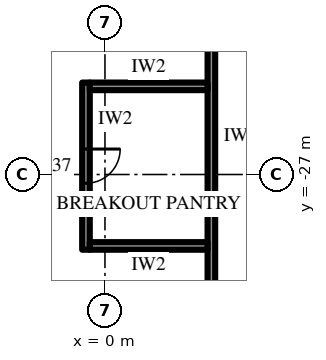
"""IFC4 building model, lengths in metres.
Left out: names, types, materials, properties, quantities, classifications, styles, units other than length and angle.
Written with IfcOpenShell. Run it as: python <this file> out.ifc"""

import sys

from ifc_helpers import new_model, si_unit, direction, frame, frame_2d, origin, place, context, subcontext, project, spatial, rectangle, extrude, element, fill, save


model = new_model("IFC4")
c1 = context("Model", 3, precision=1e-05, world=origin(), true_north=direction((0.0, 1.0)))
c2 = subcontext(c1, "Body", "Model", "MODEL_VIEW")
j1 = project(units=[si_unit("LENGTHUNIT", "METRE"), si_unit("PLANEANGLEUNIT", "RADIAN")], contexts=[c1])
p1 = place(None, origin())
s1 = spatial("IfcSite", under=j1, at=p1, CompositionType="ELEMENT")
p2 = place(p1, origin())
s2 = spatial("IfcBuilding", under=s1, at=p2, CompositionType="ELEMENT")
p3 = place(p2, frame((0.0, 0.0, 36.1)))
s3 = spatial("IfcBuildingStorey", under=s2, at=p3, CompositionType="ELEMENT", Elevation=36.1)
p4 = place(p3, frame((2.8, -18.2, 0.0), z_axis=(0.0, 0.0, 1.0), x_axis=(0.0, -1.0, 0.0)))
e1 = element("IfcWall", 1, at=p4, inside=s3, PredefinedType="PARTITIONING", context=c2, shape_type="SweptSolid", body=[
    extrude(rectangle(XDim=15.6, YDim=0.2, at=frame_2d((7.8, 0.0))), origin(), (0.0, 0.0, 1.0), 2.944),
])
p5 = place(p3, frame((-0.5, -24.58, 0.0), z_axis=(0.0, 0.0, 1.0), x_axis=(0.0, -1.0, 0.0)))
e2 = element("IfcWall", 2, at=p5, inside=s3, PredefinedType="PARTITIONING", context=c2, shape_type="SweptSolid", body=[
    extrude(rectangle(XDim=4.4, YDim=0.2, at=frame_2d((2.2, 0.0))), origin(), (0.0, 0.0, 1.0), 4.0),
])
p6 = place(p5, frame((1.75, 0.0, 0.0)))
e3 = element("IfcOpeningElement", 3, at=p6, cuts=e2, PredefinedType="OPENING", context=c2, shape_type="SweptSolid", body=[
    extrude(rectangle(XDim=0.9, YDim=2.2, at=frame_2d((0.45, 1.1))), frame((0.0, 0.11, 0.0), z_axis=(0.0, -1.0, 0.0), x_axis=(1.0, 0.0, 0.0)), (0.0, 0.0, 1.0), 0.22),
])
for number, where, z_axis, x_axis in (
    (4, (2.7, -24.68, 0.0), (0.0, 0.0, 1.0), (-1.0, 0.0, 0.0)),
    (5, (2.7, -28.88, 0.0), (0.0, 0.0, 1.0), (-1.0, 0.0, 0.0)),
):
    element("IfcWall", number, at=place(p3, frame(where, z_axis=z_axis, x_axis=x_axis)), inside=s3, PredefinedType="PARTITIONING", context=c2, shape_type="SweptSolid", body=[
        extrude(rectangle(XDim=3.1, YDim=0.2, at=frame_2d((1.55, 0.0))), origin(), (0.0, 0.0, 1.0), 4.0),
    ])
p7 = place(p6, origin())
e6 = element("IfcDoor", 6, at=p7, inside=s3, OperationType="SINGLE_SWING_RIGHT", PredefinedType="DOOR", context=c2, shape_type="SweptSolid", body=[
    extrude(rectangle(XDim=0.9, YDim=2.2, at=frame_2d((0.45, 1.1))), frame((0.0, 0.025, 0.0), z_axis=(0.0, -1.0, 0.0), x_axis=(1.0, 0.0, 0.0)), (0.0, 0.0, 1.0), 0.05),
])
fill(e3, e6)
save(model, sys.argv[1])
